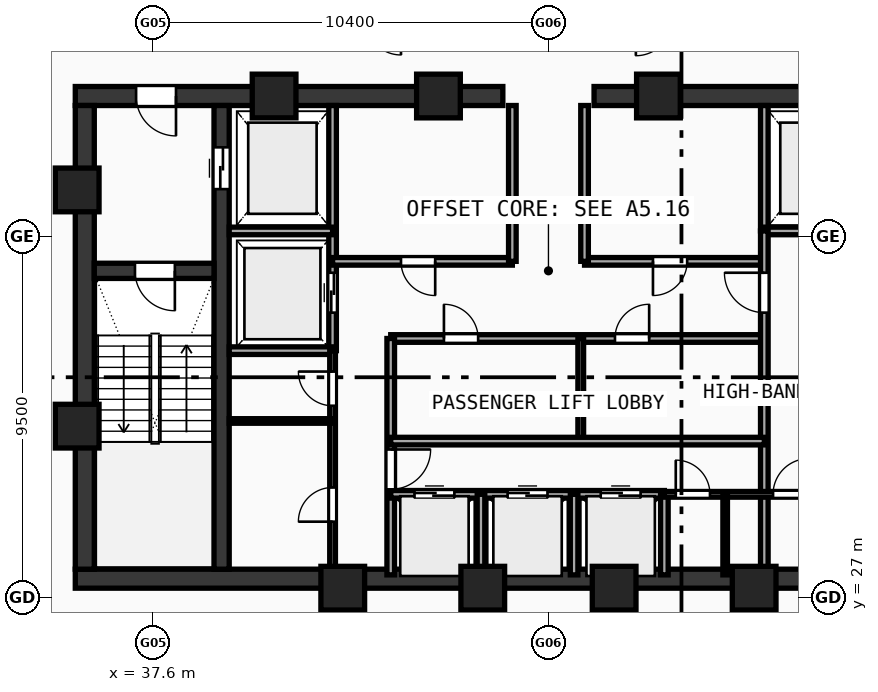
"""IFC4 building model, lengths in metres.
Left out: names, types, materials, properties, quantities, classifications, styles, units other than length and angle.
Written with IfcOpenShell. Run it as: python <this file> out.ifc"""

import sys

from ifc_helpers import new_model, si_unit, direction, frame, frame_2d, origin, origin_with_axes, origin_2d, place, context, subcontext, project, spatial, rectangle, hollow_rectangle, extrude, source, transform, mapped, element, fill, save


model = new_model("IFC4")
c1 = context("Model", 3, precision=1e-05, world=origin(), true_north=direction((0.0, 1.0)))
c2 = subcontext(c1, "Body", "Model", "MODEL_VIEW")
j1 = project(units=[si_unit("LENGTHUNIT", "METRE"), si_unit("PLANEANGLEUNIT", "RADIAN")], contexts=[c1])
p1 = place(None, origin())
s1 = spatial("IfcSite", under=j1, at=p1, CompositionType="ELEMENT")
p2 = place(p1, origin())
s2 = spatial("IfcBuilding", under=s1, at=p2, CompositionType="ELEMENT")
p3 = place(p2, frame((0.0, 0.0, 296.21)))
s3 = spatial("IfcBuildingStorey", under=s2, at=p3, CompositionType="ELEMENT", Elevation=296.21)
p4 = place(p3, frame((35.55, 27.5, 0.0), z_axis=(0.0, 0.0, 1.0), x_axis=(1.0, 0.0, 0.0)))
e1 = element("IfcWall", 1, at=p4, inside=s3, PredefinedType="SHEAR", context=c2, shape_type="SweptSolid", body=[
    extrude(rectangle(XDim=24.9, YDim=0.5, at=frame_2d((12.45, 0.0))), origin(), (0.0, 0.0, 1.0), 3.47),
])
p5 = place(p3, frame((35.55, 40.2, 0.0), z_axis=(0.0, 0.0, 1.0), x_axis=(1.0, 0.0, 0.0)))
e2 = element("IfcWall", 2, at=p5, inside=s3, PredefinedType="SHEAR", context=c2, shape_type="SweptSolid", body=[
    extrude(rectangle(XDim=11.25, YDim=0.5, at=frame_2d((5.625, 0.0))), origin(), (0.0, 0.0, 1.0), 3.47),
])
p6 = place(p5, frame((1.6, 0.0, 0.0)))
e3 = element("IfcOpeningElement", 3, at=p6, cuts=e2, PredefinedType="OPENING", context=c2, shape_type="SweptSolid", body=[
    extrude(rectangle(XDim=1.05, YDim=2.1, at=frame_2d((0.525, 1.05))), frame((0.0, 0.26, 0.0), z_axis=(0.0, -1.0, 0.0), x_axis=(1.0, 0.0, 0.0)), (0.0, 0.0, 1.0), 0.52),
])
p7 = place(p3, frame((49.2, 40.2, 0.0), z_axis=(0.0, 0.0, 1.0), x_axis=(1.0, 0.0, 0.0)))
e4 = element("IfcWall", 4, at=p7, inside=s3, PredefinedType="SHEAR", context=c2, shape_type="SweptSolid", body=[
    extrude(rectangle(XDim=11.25, YDim=0.5, at=frame_2d((5.625, 0.0))), origin(), (0.0, 0.0, 1.0), 3.47),
])
p8 = place(p7, frame((8.6, 0.0, 0.0)))
e5 = element("IfcOpeningElement", 5, at=p8, cuts=e4, PredefinedType="OPENING", context=c2, shape_type="SweptSolid", body=[
    extrude(rectangle(XDim=1.05, YDim=2.1, at=frame_2d((0.525, 1.05))), frame((0.0, 0.26, 0.0), z_axis=(0.0, -1.0, 0.0), x_axis=(1.0, 0.0, 0.0)), (0.0, 0.0, 1.0), 0.52),
])
p9 = place(p3, frame((35.8, 27.75, 0.0), z_axis=(0.0, 0.0, 1.0), x_axis=(0.0, 1.0, 0.0)))
e6 = element("IfcWall", 6, at=p9, inside=s3, PredefinedType="SHEAR", context=c2, shape_type="SweptSolid", body=[
    extrude(rectangle(XDim=12.2, YDim=0.5, at=frame_2d((6.1, 0.0))), origin(), (0.0, 0.0, 1.0), 3.47),
])
p10 = place(p3, frame((39.4, 27.75, 0.0), z_axis=(0.0, 0.0, 1.0), x_axis=(0.0, 1.0, 0.0)))
e7 = element("IfcWall", 7, at=p10, inside=s3, PredefinedType="SHEAR", context=c2, shape_type="SweptSolid", body=[
    extrude(rectangle(XDim=12.2, YDim=0.4, at=frame_2d((6.1, 0.0))), origin(), (0.0, 0.0, 1.0), 3.47),
])
p11 = place(p10, frame((10.0, 0.0, 0.0)))
e8 = element("IfcOpeningElement", 8, at=p11, cuts=e7, PredefinedType="OPENING", context=c2, shape_type="SweptSolid", body=[
    extrude(rectangle(XDim=1.1, YDim=2.1, at=frame_2d((0.55, 1.05))), frame((0.0, 0.21, 0.0), z_axis=(0.0, -1.0, 0.0), x_axis=(1.0, 0.0, 0.0)), (0.0, 0.0, 1.0), 0.42),
])
p12 = place(p3, frame((36.05, 35.6, 0.0), z_axis=(0.0, 0.0, 1.0), x_axis=(1.0, 0.0, 0.0)))
e9 = element("IfcWall", 9, at=p12, inside=s3, PredefinedType="SHEAR", context=c2, shape_type="SweptSolid", body=[
    extrude(rectangle(XDim=3.15, YDim=0.4, at=frame_2d((1.575, 0.0))), origin(), (0.0, 0.0, 1.0), 3.47),
])
p13 = place(p12, frame((1.07, 0.0, 0.0)))
e10 = element("IfcOpeningElement", 10, at=p13, cuts=e9, PredefinedType="OPENING", context=c2, shape_type="SweptSolid", body=[
    extrude(rectangle(XDim=1.05, YDim=2.1, at=frame_2d((0.525, 1.05))), frame((0.0, 0.21, 0.0), z_axis=(0.0, -1.0, 0.0), x_axis=(1.0, 0.0, 0.0)), (0.0, 0.0, 1.0), 0.42),
])
m1 = source(origin(), c2, "Body", "SweptSolid", [
    extrude(hollow_rectangle(XDim=1.15, YDim=1.15, WallThickness=0.048, at=origin_2d()), origin(), (0.0, 0.0, 1.0), 3.73),
])
for number, where, z_axis, x_axis in (
    (11, (42.588, 27.25, -0.26), (0.0, 0.0, 1.0), (1.0, 0.0, 0.0)),
    (12, (46.272, 27.25, -0.26), (0.0, 0.0, 1.0), (1.0, 0.0, 0.0)),
    (13, (49.729, 27.25, -0.26), (0.0, 0.0, 1.0), (1.0, 0.0, 0.0)),
    (14, (53.412, 27.25, -0.26), (0.0, 0.0, 1.0), (1.0, 0.0, 0.0)),
    (15, (50.894, 40.2, -0.26), (0.0, 0.0, 1.0), (1.0, 0.0, 0.0)),
    (16, (45.106, 40.2, -0.26), (0.0, 0.0, 1.0), (1.0, 0.0, 0.0)),
    (17, (40.781, 40.2, -0.26), (0.0, 0.0, 1.0), (1.0, 0.0, 0.0)),
    (18, (35.6, 37.729, -0.26), (0.0, 0.0, 1.0), (1.0, 0.0, 0.0)),
    (19, (35.6, 31.513, -0.26), (0.0, 0.0, 1.0), (1.0, 0.0, 0.0)),
):
    element("IfcColumn", number, at=place(p3, frame(where, z_axis=z_axis, x_axis=x_axis)), inside=s3, PredefinedType="COLUMN", context=c2, shape_type="MappedRepresentation", body=[
        mapped(m1, transform((0.0, 0.0, 0.0), scale=1.0)),
    ])
p14 = place(p3, frame((42.32, 33.5, 0.0), z_axis=(0.0, 0.0, 1.0), x_axis=(0.0, 1.0, 0.0)))
e20 = element("IfcWall", 20, at=p14, inside=s3, PredefinedType="SOLIDWALL", context=c2, shape_type="SweptSolid", body=[
    extrude(rectangle(XDim=6.45, YDim=0.2, at=frame_2d((3.225, 0.0))), origin(), (0.0, 0.0, 1.0), 3.47),
])
p15 = place(p14, frame((1.0, 0.0, 0.0)))
e21 = element("IfcOpeningElement", 21, at=p15, cuts=e20, PredefinedType="OPENING", context=c2, shape_type="SweptSolid", body=[
    extrude(rectangle(XDim=1.05, YDim=2.1, at=frame_2d((0.525, 1.05))), frame((0.0, 0.11, 0.0), z_axis=(0.0, -1.0, 0.0), x_axis=(1.0, 0.0, 0.0)), (0.0, 0.0, 1.0), 0.22),
])
for number, where, z_axis, x_axis in (
    (22, (39.6, 36.65, 0.0), (0.0, 0.0, 1.0), (1.0, 0.0, 0.0)),
    (23, (39.6, 33.5, 0.0), (0.0, 0.0, 1.0), (1.0, 0.0, 0.0)),
):
    element("IfcWall", number, at=place(p3, frame(where, z_axis=z_axis, x_axis=x_axis)), inside=s3, PredefinedType="SOLIDWALL", context=c2, shape_type="SweptSolid", body=[
        extrude(rectangle(XDim=2.72, YDim=0.2, at=frame_2d((1.36, 0.0))), origin(), (0.0, 0.0, 1.0), 3.47),
    ])
p16 = place(p3, frame((53.68, 36.65, 0.0), z_axis=(0.0, 0.0, 1.0), x_axis=(0.0, 1.0, 0.0)))
e24 = element("IfcWall", 24, at=p16, inside=s3, PredefinedType="SOLIDWALL", context=c2, shape_type="SweptSolid", body=[
    extrude(rectangle(XDim=3.3, YDim=0.2, at=frame_2d((1.65, 0.0))), origin(), (0.0, 0.0, 1.0), 3.47),
])
p17 = place(p3, frame((53.68, 36.65, 0.0), z_axis=(0.0, 0.0, 1.0), x_axis=(1.0, 0.0, 0.0)))
e25 = element("IfcWall", 25, at=p17, inside=s3, PredefinedType="SOLIDWALL", context=c2, shape_type="SweptSolid", body=[
    extrude(rectangle(XDim=2.72, YDim=0.2, at=frame_2d((1.36, 0.0))), origin(), (0.0, 0.0, 1.0), 3.47),
])
p18 = place(p3, frame((42.32, 35.85, 0.0), z_axis=(0.0, 0.0, 1.0), x_axis=(1.0, 0.0, 0.0)))
e26 = element("IfcWall", 26, at=p18, inside=s3, PredefinedType="SOLIDWALL", context=c2, shape_type="SweptSolid", body=[
    extrude(rectangle(XDim=4.73, YDim=0.2, at=frame_2d((2.365, 0.0))), origin(), (0.0, 0.0, 1.0), 3.47),
])
p19 = place(p18, frame((1.8, 0.0, 0.0)))
e27 = element("IfcOpeningElement", 27, at=p19, cuts=e26, PredefinedType="OPENING", context=c2, shape_type="SweptSolid", body=[
    extrude(rectangle(XDim=0.9, YDim=2.1, at=frame_2d((0.45, 1.05))), frame((0.0, 0.11, 0.0), z_axis=(0.0, -1.0, 0.0), x_axis=(1.0, 0.0, 0.0)), (0.0, 0.0, 1.0), 0.22),
])
p20 = place(p3, frame((48.95, 35.85, 0.0), z_axis=(0.0, 0.0, 1.0), x_axis=(1.0, 0.0, 0.0)))
e28 = element("IfcWall", 28, at=p20, inside=s3, PredefinedType="SOLIDWALL", context=c2, shape_type="SweptSolid", body=[
    extrude(rectangle(XDim=4.73, YDim=0.2, at=frame_2d((2.365, 0.0))), origin(), (0.0, 0.0, 1.0), 3.47),
])
p21 = place(p20, frame((1.8, 0.0, 0.0)))
e29 = element("IfcOpeningElement", 29, at=p21, cuts=e28, PredefinedType="OPENING", context=c2, shape_type="SweptSolid", body=[
    extrude(rectangle(XDim=0.9, YDim=2.1, at=frame_2d((0.45, 1.05))), frame((0.0, 0.11, 0.0), z_axis=(0.0, -1.0, 0.0), x_axis=(1.0, 0.0, 0.0)), (0.0, 0.0, 1.0), 0.22),
])
for number, where, z_axis, x_axis in (
    (30, (47.05, 35.85, 0.0), (0.0, 0.0, 1.0), (0.0, 1.0, 0.0)),
    (31, (48.95, 35.85, 0.0), (0.0, 0.0, 1.0), (0.0, 1.0, 0.0)),
):
    element("IfcWall", number, at=place(p3, frame(where, z_axis=z_axis, x_axis=x_axis)), inside=s3, PredefinedType="SOLIDWALL", context=c2, shape_type="SweptSolid", body=[
        extrude(rectangle(XDim=4.1, YDim=0.2, at=frame_2d((2.05, 0.0))), origin(), (0.0, 0.0, 1.0), 3.47),
    ])
p22 = place(p3, frame((43.85, 33.82, 0.0), z_axis=(0.0, 0.0, 1.0), x_axis=(1.0, 0.0, 0.0)))
e32 = element("IfcWall", 32, at=p22, inside=s3, PredefinedType="SOLIDWALL", context=c2, shape_type="SweptSolid", body=[
    extrude(rectangle(XDim=9.83, YDim=0.2, at=frame_2d((4.915, 0.0))), origin(), (0.0, 0.0, 1.0), 3.47),
])
p23 = place(p22, frame((1.4, 0.0, 0.0)))
e33 = element("IfcOpeningElement", 33, at=p23, cuts=e32, PredefinedType="OPENING", context=c2, shape_type="SweptSolid", body=[
    extrude(rectangle(XDim=0.9, YDim=2.1, at=frame_2d((0.45, 1.05))), frame((0.0, 0.11, 0.0), z_axis=(0.0, -1.0, 0.0), x_axis=(1.0, 0.0, 0.0)), (0.0, 0.0, 1.0), 0.22),
])
p24 = place(p22, frame((5.9, 0.0, 0.0)))
e34 = element("IfcOpeningElement", 34, at=p24, cuts=e32, PredefinedType="OPENING", context=c2, shape_type="SweptSolid", body=[
    extrude(rectangle(XDim=0.9, YDim=2.1, at=frame_2d((0.45, 1.05))), frame((0.0, 0.11, 0.0), z_axis=(0.0, -1.0, 0.0), x_axis=(1.0, 0.0, 0.0)), (0.0, 0.0, 1.0), 0.22),
])
p25 = place(p3, frame((43.85, 27.6, 0.0), z_axis=(0.0, 0.0, 1.0), x_axis=(0.0, 1.0, 0.0)))
e35 = element("IfcWall", 35, at=p25, inside=s3, PredefinedType="SOLIDWALL", context=c2, shape_type="SweptSolid", body=[
    extrude(rectangle(XDim=6.22, YDim=0.2, at=frame_2d((3.11, 0.0))), origin(), (0.0, 0.0, 1.0), 3.47),
])
p26 = place(p25, frame((2.25, 0.0, 0.0)))
e36 = element("IfcOpeningElement", 36, at=p26, cuts=e35, PredefinedType="OPENING", context=c2, shape_type="SweptSolid", body=[
    extrude(rectangle(XDim=1.05, YDim=2.1, at=frame_2d((0.525, 1.05))), frame((0.0, 0.11, 0.0), z_axis=(0.0, -1.0, 0.0), x_axis=(1.0, 0.0, 0.0)), (0.0, 0.0, 1.0), 0.22),
])
p27 = place(p3, frame((53.68, 27.6, 0.0), z_axis=(0.0, 0.0, 1.0), x_axis=(0.0, 1.0, 0.0)))
e37 = element("IfcWall", 37, at=p27, inside=s3, PredefinedType="SOLIDWALL", context=c2, shape_type="SweptSolid", body=[
    extrude(rectangle(XDim=9.05, YDim=0.2, at=frame_2d((4.525, 0.0))), origin(), (0.0, 0.0, 1.0), 3.47),
])
p28 = place(p27, frame((6.9, 0.0, 0.0)))
e38 = element("IfcOpeningElement", 38, at=p28, cuts=e37, PredefinedType="OPENING", context=c2, shape_type="SweptSolid", body=[
    extrude(rectangle(XDim=1.05, YDim=2.1, at=frame_2d((0.525, 1.05))), frame((0.0, 0.11, 0.0), z_axis=(0.0, -1.0, 0.0), x_axis=(1.0, 0.0, 0.0)), (0.0, 0.0, 1.0), 0.22),
])
p29 = place(p3, frame((48.85, 31.12, 0.0), z_axis=(0.0, 0.0, 1.0), x_axis=(0.0, 1.0, 0.0)))
e39 = element("IfcWall", 39, at=p29, inside=s3, PredefinedType="PARTITIONING", context=c2, shape_type="SweptSolid", body=[
    extrude(rectangle(XDim=2.7, YDim=0.15, at=frame_2d((1.35, 0.0))), origin(), (0.0, 0.0, 1.0), 3.47),
])
p30 = place(p3, frame((43.85, 29.72, 0.0), z_axis=(0.0, 0.0, 1.0), x_axis=(1.0, 0.0, 0.0)))
e40 = element("IfcWall", 40, at=p30, inside=s3, PredefinedType="SOLIDWALL", context=c2, shape_type="SweptSolid", body=[
    extrude(rectangle(XDim=7.2, YDim=0.2, at=frame_2d((3.6, 0.0))), origin(), (0.0, 0.0, 1.0), 3.47),
])
p31 = place(p30, frame((0.625, 0.0, 0.0)))
e41 = element("IfcOpeningElement", 41, at=p31, cuts=e40, PredefinedType="OPENING", context=c2, shape_type="SweptSolid", body=[
    extrude(rectangle(XDim=1.05, YDim=2.1, at=frame_2d((0.525, 1.05))), frame((0.0, 0.11, 0.0), z_axis=(0.0, -1.0, 0.0), x_axis=(1.0, 0.0, 0.0)), (0.0, 0.0, 1.0), 0.22),
])
p32 = place(p30, frame((3.075, 0.0, 0.0)))
e42 = element("IfcOpeningElement", 42, at=p32, cuts=e40, PredefinedType="OPENING", context=c2, shape_type="SweptSolid", body=[
    extrude(rectangle(XDim=1.05, YDim=2.1, at=frame_2d((0.525, 1.05))), frame((0.0, 0.11, 0.0), z_axis=(0.0, -1.0, 0.0), x_axis=(1.0, 0.0, 0.0)), (0.0, 0.0, 1.0), 0.22),
])
p33 = place(p30, frame((5.525, 0.0, 0.0)))
e43 = element("IfcOpeningElement", 43, at=p33, cuts=e40, PredefinedType="OPENING", context=c2, shape_type="SweptSolid", body=[
    extrude(rectangle(XDim=1.05, YDim=2.1, at=frame_2d((0.525, 1.05))), frame((0.0, 0.11, 0.0), z_axis=(0.0, -1.0, 0.0), x_axis=(1.0, 0.0, 0.0)), (0.0, 0.0, 1.0), 0.22),
])
p34 = place(p3, frame((51.05, 27.6, 0.0), z_axis=(0.0, 0.0, 1.0), x_axis=(0.0, 1.0, 0.0)))
e44 = element("IfcWall", 44, at=p34, inside=s3, PredefinedType="SOLIDWALL", context=c2, shape_type="SweptSolid", body=[
    extrude(rectangle(XDim=2.12, YDim=0.2, at=frame_2d((1.06, 0.0))), origin(), (0.0, 0.0, 1.0), 3.47),
])
p35 = place(p3, frame((43.85, 31.12, 0.0), z_axis=(0.0, 0.0, 1.0), x_axis=(1.0, 0.0, 0.0)))
e45 = element("IfcWall", 45, at=p35, inside=s3, PredefinedType="SOLIDWALL", context=c2, shape_type="SweptSolid", body=[
    extrude(rectangle(XDim=9.83, YDim=0.2, at=frame_2d((4.915, 0.0))), origin(), (0.0, 0.0, 1.0), 3.47),
])
for number, where, z_axis, x_axis in (
    (46, (46.225, 27.6, 0.0), (0.0, 0.0, 1.0), (0.0, 1.0, 0.0)),
    (47, (48.675, 27.6, 0.0), (0.0, 0.0, 1.0), (0.0, 1.0, 0.0)),
):
    element("IfcWall", number, at=place(p3, frame(where, z_axis=z_axis, x_axis=x_axis)), inside=s3, PredefinedType="SOLIDWALL", context=c2, shape_type="SweptSolid", body=[
        extrude(rectangle(XDim=2.12, YDim=0.2, at=frame_2d((1.06, 0.0))), origin(), (0.0, 0.0, 1.0), 3.47),
    ])
p36 = place(p3, frame((42.32, 27.6, 0.0), z_axis=(0.0, 0.0, 1.0), x_axis=(0.0, 1.0, 0.0)))
e48 = element("IfcWall", 48, at=p36, inside=s3, PredefinedType="PARTITIONING", context=c2, shape_type="SweptSolid", body=[
    extrude(rectangle(XDim=5.9, YDim=0.15, at=frame_2d((2.95, 0.0))), origin(), (0.0, 0.0, 1.0), 3.47),
])
p37 = place(p36, frame((1.4, 0.0, 0.0)))
e49 = element("IfcOpeningElement", 49, at=p37, cuts=e48, PredefinedType="OPENING", context=c2, shape_type="SweptSolid", body=[
    extrude(rectangle(XDim=0.9, YDim=2.1, at=frame_2d((0.45, 1.05))), frame((0.0, 0.085, 0.0), z_axis=(0.0, -1.0, 0.0), x_axis=(1.0, 0.0, 0.0)), (0.0, 0.0, 1.0), 0.17),
])
p38 = place(p36, frame((4.45, 0.0, 0.0)))
e50 = element("IfcOpeningElement", 50, at=p38, cuts=e48, PredefinedType="OPENING", context=c2, shape_type="SweptSolid", body=[
    extrude(rectangle(XDim=0.9, YDim=2.1, at=frame_2d((0.45, 1.05))), frame((0.0, 0.085, 0.0), z_axis=(0.0, -1.0, 0.0), x_axis=(1.0, 0.0, 0.0)), (0.0, 0.0, 1.0), 0.17),
])
p39 = place(p3, frame((51.05, 29.72, 0.0), z_axis=(0.0, 0.0, 1.0), x_axis=(1.0, 0.0, 0.0)))
e51 = element("IfcWall", 51, at=p39, inside=s3, PredefinedType="PARTITIONING", context=c2, shape_type="SweptSolid", body=[
    extrude(rectangle(XDim=4.07, YDim=0.15, at=frame_2d((2.035, 0.0))), origin(), (0.0, 0.0, 1.0), 3.47),
])
p40 = place(p39, frame((0.3, 0.0, 0.0)))
e52 = element("IfcOpeningElement", 52, at=p40, cuts=e51, PredefinedType="OPENING", context=c2, shape_type="SweptSolid", body=[
    extrude(rectangle(XDim=0.9, YDim=2.1, at=frame_2d((0.45, 1.05))), frame((0.0, 0.085, 0.0), z_axis=(0.0, -1.0, 0.0), x_axis=(1.0, 0.0, 0.0)), (0.0, 0.0, 1.0), 0.17),
])
p41 = place(p39, frame((2.86, 0.0, 0.0)))
e53 = element("IfcOpeningElement", 53, at=p41, cuts=e51, PredefinedType="OPENING", context=c2, shape_type="SweptSolid", body=[
    extrude(rectangle(XDim=0.94, YDim=2.1, at=frame_2d((0.47, 1.05))), frame((0.0, 0.085, 0.0), z_axis=(0.0, -1.0, 0.0), x_axis=(1.0, 0.0, 0.0)), (0.0, 0.0, 1.0), 0.17),
])
p42 = place(p3, frame((39.6, 31.65, 0.0), z_axis=(0.0, 0.0, 1.0), x_axis=(1.0, 0.0, 0.0)))
e54 = element("IfcWall", 54, at=p42, inside=s3, PredefinedType="PARTITIONING", context=c2, shape_type="SweptSolid", body=[
    extrude(rectangle(XDim=2.72, YDim=0.12, at=frame_2d((1.36, 0.0))), origin(), (0.0, 0.0, 1.0), 3.47),
])
p43 = place(p3, frame((52.65, 27.6, 0.0), z_axis=(0.0, 0.0, 1.0), x_axis=(0.0, 1.0, 0.0)))
e55 = element("IfcWall", 55, at=p43, inside=s3, PredefinedType="PARTITIONING", context=c2, shape_type="SweptSolid", body=[
    extrude(rectangle(XDim=2.12, YDim=0.12, at=frame_2d((1.06, 0.0))), origin(), (0.0, 0.0, 1.0), 3.47),
])
m2 = source(origin(), c2, "Body", "SweptSolid", [
    extrude(rectangle(XDim=1.05, YDim=2.1, at=frame_2d((0.525, 1.05))), frame((0.0, 0.025, 0.0), z_axis=(0.0, -1.0, 0.0), x_axis=(1.0, 0.0, 0.0)), (0.0, 0.0, 1.0), 0.05),
])
p44 = place(p13, frame((1.05, 0.0, 0.0), z_axis=(0.0, 0.0, 1.0), x_axis=(-1.0, 0.0, 0.0)))
e56 = element("IfcDoor", 56, at=p44, inside=s3, OperationType="SINGLE_SWING_LEFT", PredefinedType="DOOR", context=c2, shape_type="MappedRepresentation", body=[
    mapped(m2, transform((0.0, 0.0, 0.0), scale=1.0)),
])
fill(e10, e56)
p45 = place(p6, frame((1.05, 0.0, 0.0), z_axis=(0.0, 0.0, 1.0), x_axis=(-1.0, 0.0, 0.0)))
e57 = element("IfcDoor", 57, at=p45, inside=s3, OperationType="SINGLE_SWING_LEFT", PredefinedType="DOOR", context=c2, shape_type="MappedRepresentation", body=[
    mapped(m2, transform((0.0, 0.0, 0.0), scale=1.0)),
])
fill(e3, e57)
m3 = source(origin(), c2, "Body", "SweptSolid", [
    extrude(rectangle(XDim=1.1, YDim=2.1, at=frame_2d((0.55, 1.05))), frame((0.0, 0.025, 0.0), z_axis=(0.0, -1.0, 0.0), x_axis=(1.0, 0.0, 0.0)), (0.0, 0.0, 1.0), 0.05),
])
p46 = place(p11, frame((1.1, 0.0, 0.0), z_axis=(0.0, 0.0, 1.0), x_axis=(-1.0, 0.0, 0.0)))
e58 = element("IfcDoor", 58, at=p46, inside=s3, OperationType="DOUBLE_DOOR_SLIDING", PredefinedType="DOOR", context=c2, shape_type="MappedRepresentation", body=[
    mapped(m3, transform((0.0, 0.0, 0.0), scale=1.0)),
])
fill(e8, e58)
p47 = place(p15, origin_with_axes())
e59 = element("IfcDoor", 59, at=p47, inside=s3, OperationType="DOUBLE_DOOR_SLIDING", PredefinedType="DOOR", context=c2, shape_type="MappedRepresentation", body=[
    mapped(m2, transform((0.0, 0.0, 0.0), scale=1.0)),
])
fill(e21, e59)
m4 = source(origin(), c2, "Body", "SweptSolid", [
    extrude(rectangle(XDim=0.9, YDim=2.1, at=frame_2d((0.45, 1.05))), frame((0.0, 0.025, 0.0), z_axis=(0.0, -1.0, 0.0), x_axis=(1.0, 0.0, 0.0)), (0.0, 0.0, 1.0), 0.05),
])
p48 = place(p19, frame((0.9, 0.0, 0.0), z_axis=(0.0, 0.0, 1.0), x_axis=(-1.0, 0.0, 0.0)))
e60 = element("IfcDoor", 60, at=p48, inside=s3, OperationType="SINGLE_SWING_LEFT", PredefinedType="DOOR", context=c2, shape_type="MappedRepresentation", body=[
    mapped(m4, transform((0.0, 0.0, 0.0), scale=1.0)),
])
fill(e27, e60)
p49 = place(p21, frame((0.9, 0.0, 0.0), z_axis=(0.0, 0.0, 1.0), x_axis=(-1.0, 0.0, 0.0)))
e61 = element("IfcDoor", 61, at=p49, inside=s3, OperationType="SINGLE_SWING_RIGHT", PredefinedType="DOOR", context=c2, shape_type="MappedRepresentation", body=[
    mapped(m4, transform((0.0, 0.0, 0.0), scale=1.0)),
])
fill(e29, e61)
p50 = place(p23, origin_with_axes())
e62 = element("IfcDoor", 62, at=p50, inside=s3, OperationType="SINGLE_SWING_LEFT", PredefinedType="DOOR", context=c2, shape_type="MappedRepresentation", body=[
    mapped(m4, transform((0.0, 0.0, 0.0), scale=1.0)),
])
fill(e33, e62)
p51 = place(p24, origin_with_axes())
e63 = element("IfcDoor", 63, at=p51, inside=s3, OperationType="SINGLE_SWING_RIGHT", PredefinedType="DOOR", context=c2, shape_type="MappedRepresentation", body=[
    mapped(m4, transform((0.0, 0.0, 0.0), scale=1.0)),
])
fill(e34, e63)
p52 = place(p26, frame((1.05, 0.0, 0.0), z_axis=(0.0, 0.0, 1.0), x_axis=(-1.0, 0.0, 0.0)))
e64 = element("IfcDoor", 64, at=p52, inside=s3, OperationType="SINGLE_SWING_LEFT", PredefinedType="DOOR", context=c2, shape_type="MappedRepresentation", body=[
    mapped(m2, transform((0.0, 0.0, 0.0), scale=1.0)),
])
fill(e36, e64)
p53 = place(p28, origin_with_axes())
e65 = element("IfcDoor", 65, at=p53, inside=s3, OperationType="SINGLE_SWING_RIGHT", PredefinedType="DOOR", context=c2, shape_type="MappedRepresentation", body=[
    mapped(m2, transform((0.0, 0.0, 0.0), scale=1.0)),
])
fill(e38, e65)
p54 = place(p31, origin_with_axes())
e66 = element("IfcDoor", 66, at=p54, inside=s3, OperationType="DOUBLE_DOOR_SLIDING", PredefinedType="DOOR", context=c2, shape_type="MappedRepresentation", body=[
    mapped(m2, transform((0.0, 0.0, 0.0), scale=1.0)),
])
fill(e41, e66)
p55 = place(p32, origin_with_axes())
e67 = element("IfcDoor", 67, at=p55, inside=s3, OperationType="DOUBLE_DOOR_SLIDING", PredefinedType="DOOR", context=c2, shape_type="MappedRepresentation", body=[
    mapped(m2, transform((0.0, 0.0, 0.0), scale=1.0)),
])
fill(e42, e67)
p56 = place(p33, origin_with_axes())
e68 = element("IfcDoor", 68, at=p56, inside=s3, OperationType="DOUBLE_DOOR_SLIDING", PredefinedType="DOOR", context=c2, shape_type="MappedRepresentation", body=[
    mapped(m2, transform((0.0, 0.0, 0.0), scale=1.0)),
])
fill(e43, e68)
p57 = place(p37, origin_with_axes())
e69 = element("IfcDoor", 69, at=p57, inside=s3, OperationType="SINGLE_SWING_LEFT", PredefinedType="DOOR", context=c2, shape_type="MappedRepresentation", body=[
    mapped(m4, transform((0.0, 0.0, 0.0), scale=1.0)),
])
fill(e49, e69)
p58 = place(p38, origin_with_axes())
e70 = element("IfcDoor", 70, at=p58, inside=s3, OperationType="SINGLE_SWING_RIGHT", PredefinedType="DOOR", context=c2, shape_type="MappedRepresentation", body=[
    mapped(m4, transform((0.0, 0.0, 0.0), scale=1.0)),
])
fill(e50, e70)
p59 = place(p40, origin_with_axes())
e71 = element("IfcDoor", 71, at=p59, inside=s3, OperationType="SINGLE_SWING_LEFT", PredefinedType="DOOR", context=c2, shape_type="MappedRepresentation", body=[
    mapped(m4, transform((0.0, 0.0, 0.0), scale=1.0)),
])
fill(e52, e71)
m5 = source(origin(), c2, "Body", "SweptSolid", [
    extrude(rectangle(XDim=0.94, YDim=2.1, at=frame_2d((0.47, 1.05))), frame((0.0, 0.025, 0.0), z_axis=(0.0, -1.0, 0.0), x_axis=(1.0, 0.0, 0.0)), (0.0, 0.0, 1.0), 0.05),
])
p60 = place(p41, origin_with_axes())
e72 = element("IfcDoor", 72, at=p60, inside=s3, OperationType="SINGLE_SWING_RIGHT", PredefinedType="DOOR", context=c2, shape_type="MappedRepresentation", body=[
    mapped(m5, transform((0.0, 0.0, 0.0), scale=1.0)),
])
fill(e53, e72)
save(model, sys.argv[1])
